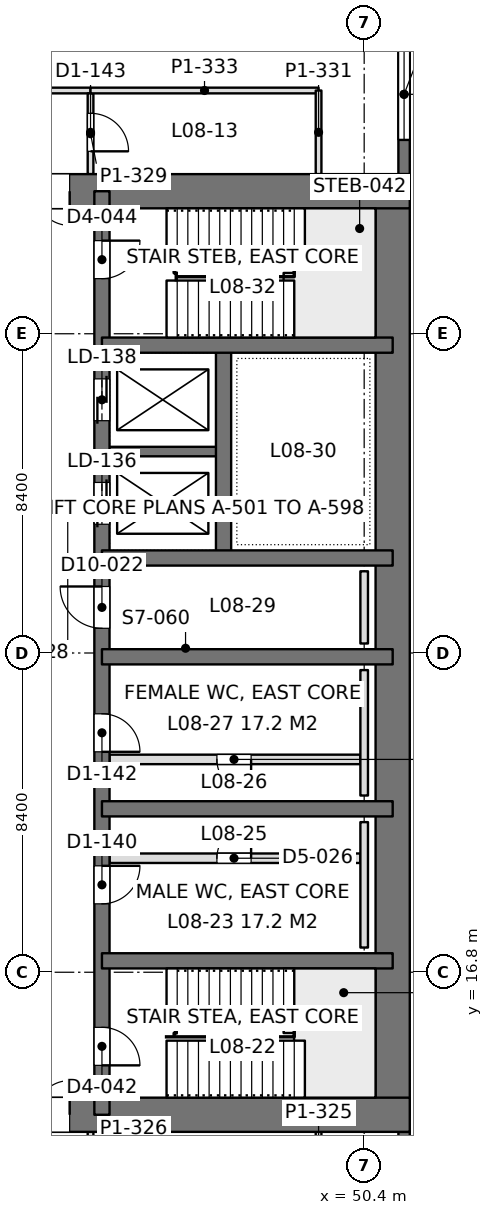
"""IFC4 building model, lengths in metres.
Left out: names, types, materials, properties, quantities, classifications, styles, units other than length and angle.
Written with IfcOpenShell. Run it as: python <this file> out.ifc"""

import sys

from ifc_helpers import new_model, si_unit, direction, frame, frame_2d, origin, place, context, subcontext, project, spatial, rectangle, extrude, element, fill, save


model = new_model("IFC4")
c1 = context("Model", 3, precision=1e-05, world=origin(), true_north=direction((0.0, 1.0)))
c2 = subcontext(c1, "Body", "Model", "MODEL_VIEW")
j1 = project(units=[si_unit("LENGTHUNIT", "METRE"), si_unit("PLANEANGLEUNIT", "RADIAN")], contexts=[c1])
p1 = place(None, origin())
s1 = spatial("IfcSite", under=j1, at=p1, CompositionType="ELEMENT")
p2 = place(p1, origin())
s2 = spatial("IfcBuilding", under=s1, at=p2, CompositionType="ELEMENT")
p3 = place(p2, frame((0.0, 0.0, 36.9)))
s3 = spatial("IfcBuildingStorey", under=s2, at=p3, CompositionType="ELEMENT", Elevation=36.9)
p4 = place(p3, frame((33.6, 13.05, 0.0), z_axis=(0.0, 0.0, 1.0), x_axis=(1.0, 0.0, 0.0)))
e1 = element("IfcWall", 1, at=p4, inside=s3, PredefinedType="SHEAR", context=c2, shape_type="SweptSolid", body=[
    extrude(rectangle(XDim=18.0, YDim=0.9, at=frame_2d((9.0, 0.0))), origin(), (0.0, 0.0, 1.0), 4.5),
])
p5 = place(p4, frame((7.25, 0.0, 0.0)))
e2 = element("IfcOpeningElement", 2, at=p5, cuts=e1, PredefinedType="OPENING", context=c2, shape_type="SweptSolid", body=[
    extrude(rectangle(XDim=1.8, YDim=2.4, at=frame_2d((0.9, 1.2))), frame((0.0, 0.46, 0.0), z_axis=(0.0, -1.0, 0.0), x_axis=(1.0, 0.0, 0.0)), (0.0, 0.0, 1.0), 0.92),
])
p6 = place(p3, frame((33.6, 37.35, 0.0), z_axis=(0.0, 0.0, 1.0), x_axis=(1.0, 0.0, 0.0)))
e3 = element("IfcWall", 3, at=p6, inside=s3, PredefinedType="SHEAR", context=c2, shape_type="SweptSolid", body=[
    extrude(rectangle(XDim=18.0, YDim=0.9, at=frame_2d((9.0, 0.0))), origin(), (0.0, 0.0, 1.0), 4.5),
])
p7 = place(p6, frame((7.25, 0.0, 0.0)))
e4 = element("IfcOpeningElement", 4, at=p7, cuts=e3, PredefinedType="OPENING", context=c2, shape_type="SweptSolid", body=[
    extrude(rectangle(XDim=1.8, YDim=2.4, at=frame_2d((0.9, 1.2))), frame((0.0, 0.46, 0.0), z_axis=(0.0, -1.0, 0.0), x_axis=(1.0, 0.0, 0.0)), (0.0, 0.0, 1.0), 0.92),
])
p8 = place(p3, frame((51.15, 13.05, 0.0), z_axis=(0.0, 0.0, 1.0), x_axis=(0.0, 1.0, 0.0)))
e5 = element("IfcWall", 5, at=p8, inside=s3, PredefinedType="SHEAR", context=c2, shape_type="SweptSolid", body=[
    extrude(rectangle(XDim=24.3, YDim=0.9, at=frame_2d((12.15, 0.0))), origin(), (0.0, 0.0, 1.0), 4.5),
])
p9 = place(p3, frame((43.5, 13.05, 0.0), z_axis=(0.0, 0.0, 1.0), x_axis=(0.0, 1.0, 0.0)))
e6 = element("IfcWall", 6, at=p9, inside=s3, PredefinedType="SHEAR", context=c2, shape_type="SweptSolid", body=[
    extrude(rectangle(XDim=24.3, YDim=0.4, at=frame_2d((12.15, 0.0))), origin(), (0.0, 0.0, 1.0), 4.5),
])
p10 = place(p9, frame((1.3, 0.0, 0.0)))
e7 = element("IfcOpeningElement", 7, at=p10, cuts=e6, PredefinedType="OPENING", context=c2, shape_type="SweptSolid", body=[
    extrude(rectangle(XDim=1.0, YDim=2.2, at=frame_2d((0.5, 1.1))), frame((0.0, 0.21, 0.0), z_axis=(0.0, -1.0, 0.0), x_axis=(1.0, 0.0, 0.0)), (0.0, 0.0, 1.0), 0.42),
])
p11 = place(p9, frame((22.0, 0.0, 0.0)))
e8 = element("IfcOpeningElement", 8, at=p11, cuts=e6, PredefinedType="OPENING", context=c2, shape_type="SweptSolid", body=[
    extrude(rectangle(XDim=1.0, YDim=2.2, at=frame_2d((0.5, 1.1))), frame((0.0, 0.21, 0.0), z_axis=(0.0, -1.0, 0.0), x_axis=(1.0, 0.0, 0.0)), (0.0, 0.0, 1.0), 0.42),
])
p12 = place(p9, frame((5.55, 0.0, 0.0)))
e9 = element("IfcOpeningElement", 9, at=p12, cuts=e6, PredefinedType="OPENING", context=c2, shape_type="SweptSolid", body=[
    extrude(rectangle(XDim=1.0, YDim=2.2, at=frame_2d((0.5, 1.1))), frame((0.0, 0.21, 0.0), z_axis=(0.0, -1.0, 0.0), x_axis=(1.0, 0.0, 0.0)), (0.0, 0.0, 1.0), 0.42),
])
p13 = place(p9, frame((9.55, 0.0, 0.0)))
e10 = element("IfcOpeningElement", 10, at=p13, cuts=e6, PredefinedType="OPENING", context=c2, shape_type="SweptSolid", body=[
    extrude(rectangle(XDim=1.0, YDim=2.2, at=frame_2d((0.5, 1.1))), frame((0.0, 0.21, 0.0), z_axis=(0.0, -1.0, 0.0), x_axis=(1.0, 0.0, 0.0)), (0.0, 0.0, 1.0), 0.42),
])
p14 = place(p9, frame((12.8, 0.0, 0.0)))
e11 = element("IfcOpeningElement", 11, at=p14, cuts=e6, PredefinedType="OPENING", context=c2, shape_type="SweptSolid", body=[
    extrude(rectangle(XDim=1.1, YDim=2.2, at=frame_2d((0.55, 1.1))), frame((0.0, 0.21, 0.0), z_axis=(0.0, -1.0, 0.0), x_axis=(1.0, 0.0, 0.0)), (0.0, 0.0, 1.0), 0.42),
])
p15 = place(p9, frame((15.538, 0.0, 0.0)))
e12 = element("IfcOpeningElement", 12, at=p15, cuts=e6, PredefinedType="OPENING", context=c2, shape_type="SweptSolid", body=[
    extrude(rectangle(XDim=1.1, YDim=2.2, at=frame_2d((0.55, 1.1))), frame((0.0, 0.21, 0.0), z_axis=(0.0, -1.0, 0.0), x_axis=(1.0, 0.0, 0.0)), (0.0, 0.0, 1.0), 0.42),
])
p16 = place(p9, frame((18.262, 0.0, 0.0)))
e13 = element("IfcOpeningElement", 13, at=p16, cuts=e6, PredefinedType="OPENING", context=c2, shape_type="SweptSolid", body=[
    extrude(rectangle(XDim=1.1, YDim=2.2, at=frame_2d((0.55, 1.1))), frame((0.0, 0.21, 0.0), z_axis=(0.0, -1.0, 0.0), x_axis=(1.0, 0.0, 0.0)), (0.0, 0.0, 1.0), 0.42),
])
for number, where, z_axis, x_axis in (
    (14, (51.15, 17.1, 0.0), (0.0, 0.0, 1.0), (-1.0, 0.0, 0.0)),
    (15, (51.15, 21.1, 0.0), (0.0, 0.0, 1.0), (-1.0, 0.0, 0.0)),
    (16, (51.15, 25.1, 0.0), (0.0, 0.0, 1.0), (-1.0, 0.0, 0.0)),
    (17, (51.15, 27.7, 0.0), (0.0, 0.0, 1.0), (-1.0, 0.0, 0.0)),
    (18, (51.15, 33.3, 0.0), (0.0, 0.0, 1.0), (-1.0, 0.0, 0.0)),
):
    element("IfcWall", number, at=place(p3, frame(where, z_axis=z_axis, x_axis=x_axis)), inside=s3, PredefinedType="SHEAR", context=c2, shape_type="SweptSolid", body=[
        extrude(rectangle(XDim=7.65, YDim=0.4, at=frame_2d((3.825, 0.0))), origin(), (0.0, 0.0, 1.0), 4.5),
    ])
p17 = place(p3, frame((46.7, 27.7, 0.0), z_axis=(0.0, 0.0, 1.0), x_axis=(0.0, 1.0, 0.0)))
e19 = element("IfcWall", 19, at=p17, inside=s3, PredefinedType="SHEAR", context=c2, shape_type="SweptSolid", body=[
    extrude(rectangle(XDim=5.6, YDim=0.4, at=frame_2d((2.8, 0.0))), origin(), (0.0, 0.0, 1.0), 4.5),
])
p18 = place(p3, frame((46.7, 30.5, 0.0), z_axis=(0.0, 0.0, 1.0), x_axis=(-1.0, 0.0, 0.0)))
e20 = element("IfcWall", 20, at=p18, inside=s3, PredefinedType="SHEAR", context=c2, shape_type="SweptSolid", body=[
    extrude(rectangle(XDim=3.2, YDim=0.25, at=frame_2d((1.6, 0.0))), origin(), (0.0, 0.0, 1.0), 4.5),
])
p19 = place(p3, frame((51.45, 42.0, 0.0), z_axis=(0.0, 0.0, 1.0), x_axis=(0.0, -1.0, 0.0)))
e21 = element("IfcWall", 21, at=p19, inside=s3, PredefinedType="SOLIDWALL", context=c2, shape_type="SweptSolid", body=[
    extrude(rectangle(XDim=4.2, YDim=0.3, at=frame_2d((2.1, 0.0))), origin(), (0.0, 0.0, 1.0), 4.34),
])
p20 = place(p19, frame((0.9, 0.0, 0.9)))
e22 = element("IfcOpeningElement", 22, at=p20, cuts=e21, PredefinedType="OPENING", context=c2, shape_type="SweptSolid", body=[
    extrude(rectangle(XDim=2.4, YDim=1.9, at=frame_2d((1.2, 0.95))), frame((0.0, 0.16, 0.0), z_axis=(0.0, -1.0, 0.0), x_axis=(1.0, 0.0, 0.0)), (0.0, 0.0, 1.0), 0.32),
])
p21 = place(p3, frame((51.45, 12.6, 0.0), z_axis=(0.0, 0.0, 1.0), x_axis=(0.0, -1.0, 0.0)))
e23 = element("IfcWall", 23, at=p21, inside=s3, PredefinedType="SOLIDWALL", context=c2, shape_type="SweptSolid", body=[
    extrude(rectangle(XDim=4.2, YDim=0.3, at=frame_2d((2.1, 0.0))), origin(), (0.0, 0.0, 1.0), 4.34),
])
p22 = place(p21, frame((0.9, 0.0, 0.9)))
e24 = element("IfcOpeningElement", 24, at=p22, cuts=e23, PredefinedType="OPENING", context=c2, shape_type="SweptSolid", body=[
    extrude(rectangle(XDim=2.4, YDim=1.9, at=frame_2d((1.2, 0.95))), frame((0.0, 0.16, 0.0), z_axis=(0.0, -1.0, 0.0), x_axis=(1.0, 0.0, 0.0)), (0.0, 0.0, 1.0), 0.32),
])
p23 = place(p3, frame((43.2, 10.474, 0.0), z_axis=(0.0, 0.0, 1.0), x_axis=(0.0, 1.0, 0.0)))
e25 = element("IfcWall", 25, at=p23, inside=s3, PredefinedType="PARTITIONING", context=c2, shape_type="SweptSolid", body=[
    extrude(rectangle(XDim=2.128, YDim=0.15, at=frame_2d((1.064, 0.0))), origin(), (0.0, 0.0, 1.0), 4.34),
])
p24 = place(p23, frame((0.526, 0.0, 0.0)))
e26 = element("IfcOpeningElement", 26, at=p24, cuts=e25, PredefinedType="OPENING", context=c2, shape_type="SweptSolid", body=[
    extrude(rectangle(XDim=1.0, YDim=2.2, at=frame_2d((0.5, 1.1))), frame((0.0, 0.085, 0.0), z_axis=(0.0, -1.0, 0.0), x_axis=(1.0, 0.0, 0.0)), (0.0, 0.0, 1.0), 0.17),
])
p25 = place(p3, frame((49.2, 10.4, 0.0), z_axis=(0.0, 0.0, 1.0), x_axis=(0.0, 1.0, 0.0)))
e27 = element("IfcWall", 27, at=p25, inside=s3, PredefinedType="PARTITIONING", context=c2, shape_type="SweptSolid", body=[
    extrude(rectangle(XDim=2.202, YDim=0.15, at=frame_2d((1.101, 0.0))), origin(), (0.0, 0.0, 1.0), 4.34),
])
p26 = place(p3, frame((1.2, 40.0, 0.0), z_axis=(0.0, 0.0, 1.0), x_axis=(1.0, 0.0, 0.0)))
e28 = element("IfcWall", 28, at=p26, inside=s3, PredefinedType="PARTITIONING", context=c2, shape_type="SweptSolid", body=[
    extrude(rectangle(XDim=42.002, YDim=0.15, at=frame_2d((21.001, 0.0))), origin(), (0.0, 0.0, 1.0), 3.74),
])
p27 = place(p26, frame((2.1, 0.0, 0.0)))
e29 = element("IfcOpeningElement", 29, at=p27, cuts=e28, PredefinedType="OPENING", context=c2, shape_type="SweptSolid", body=[
    extrude(rectangle(XDim=1.8, YDim=2.2, at=frame_2d((0.9, 1.1))), frame((0.0, 0.085, 0.0), z_axis=(0.0, -1.0, 0.0), x_axis=(1.0, 0.0, 0.0)), (0.0, 0.0, 1.0), 0.17),
])
p28 = place(p26, frame((10.5, 0.0, 0.0)))
e30 = element("IfcOpeningElement", 30, at=p28, cuts=e28, PredefinedType="OPENING", context=c2, shape_type="SweptSolid", body=[
    extrude(rectangle(XDim=1.8, YDim=2.2, at=frame_2d((0.9, 1.1))), frame((0.0, 0.085, 0.0), z_axis=(0.0, -1.0, 0.0), x_axis=(1.0, 0.0, 0.0)), (0.0, 0.0, 1.0), 0.17),
])
p29 = place(p26, frame((18.9, 0.0, 0.0)))
e31 = element("IfcOpeningElement", 31, at=p29, cuts=e28, PredefinedType="OPENING", context=c2, shape_type="SweptSolid", body=[
    extrude(rectangle(XDim=1.8, YDim=2.2, at=frame_2d((0.9, 1.1))), frame((0.0, 0.085, 0.0), z_axis=(0.0, -1.0, 0.0), x_axis=(1.0, 0.0, 0.0)), (0.0, 0.0, 1.0), 0.17),
])
p30 = place(p26, frame((27.3, 0.0, 0.0)))
e32 = element("IfcOpeningElement", 32, at=p30, cuts=e28, PredefinedType="OPENING", context=c2, shape_type="SweptSolid", body=[
    extrude(rectangle(XDim=1.8, YDim=2.2, at=frame_2d((0.9, 1.1))), frame((0.0, 0.085, 0.0), z_axis=(0.0, -1.0, 0.0), x_axis=(1.0, 0.0, 0.0)), (0.0, 0.0, 1.0), 0.17),
])
p31 = place(p26, frame((35.7, 0.0, 0.0)))
e33 = element("IfcOpeningElement", 33, at=p31, cuts=e28, PredefinedType="OPENING", context=c2, shape_type="SweptSolid", body=[
    extrude(rectangle(XDim=1.8, YDim=2.2, at=frame_2d((0.9, 1.1))), frame((0.0, 0.085, 0.0), z_axis=(0.0, -1.0, 0.0), x_axis=(1.0, 0.0, 0.0)), (0.0, 0.0, 1.0), 0.17),
])
p32 = place(p3, frame((43.2, 37.8, 0.0), z_axis=(0.0, 0.0, 1.0), x_axis=(0.0, 1.0, 0.0)))
e34 = element("IfcWall", 34, at=p32, inside=s3, PredefinedType="PARTITIONING", context=c2, shape_type="SweptSolid", body=[
    extrude(rectangle(XDim=2.126, YDim=0.15, at=frame_2d((1.063, 0.0))), origin(), (0.0, 0.0, 1.0), 4.34),
])
p33 = place(p32, frame((0.6, 0.0, 0.0)))
e35 = element("IfcOpeningElement", 35, at=p33, cuts=e34, PredefinedType="OPENING", context=c2, shape_type="SweptSolid", body=[
    extrude(rectangle(XDim=1.0, YDim=2.2, at=frame_2d((0.5, 1.1))), frame((0.0, 0.085, 0.0), z_axis=(0.0, -1.0, 0.0), x_axis=(1.0, 0.0, 0.0)), (0.0, 0.0, 1.0), 0.17),
])
p34 = place(p3, frame((43.198, 40.0, 0.0), z_axis=(0.0, 0.0, 1.0), x_axis=(1.0, 0.0, 0.0)))
e36 = element("IfcWall", 36, at=p34, inside=s3, PredefinedType="PARTITIONING", context=c2, shape_type="SweptSolid", body=[
    extrude(rectangle(XDim=6.002, YDim=0.15, at=frame_2d((3.001, 0.0))), origin(), (0.0, 0.0, 1.0), 3.98),
])
p35 = place(p3, frame((49.2, 37.8, 0.0), z_axis=(0.0, 0.0, 1.0), x_axis=(0.0, 1.0, 0.0)))
e37 = element("IfcWall", 37, at=p35, inside=s3, PredefinedType="PARTITIONING", context=c2, shape_type="SweptSolid", body=[
    extrude(rectangle(XDim=2.2, YDim=0.15, at=frame_2d((1.1, 0.0))), origin(), (0.0, 0.0, 1.0), 4.34),
])
p36 = place(p3, frame((43.7, 22.4, 0.0), z_axis=(0.0, 0.0, 1.0), x_axis=(1.0, 0.0, 0.0)))
e38 = element("IfcWall", 38, at=p36, inside=s3, PredefinedType="PARTITIONING", context=c2, shape_type="SweptSolid", body=[
    extrude(rectangle(XDim=6.6, YDim=0.25, at=frame_2d((3.3, 0.0))), origin(), (0.0, 0.0, 1.0), 4.3),
])
p37 = place(p36, frame((2.825, 0.0, 0.0)))
e39 = element("IfcOpeningElement", 39, at=p37, cuts=e38, PredefinedType="OPENING", context=c2, shape_type="SweptSolid", body=[
    extrude(rectangle(XDim=0.9, YDim=2.2, at=frame_2d((0.45, 1.1))), frame((0.0, 0.135, 0.0), z_axis=(0.0, -1.0, 0.0), x_axis=(1.0, 0.0, 0.0)), (0.0, 0.0, 1.0), 0.27),
])
p38 = place(p3, frame((43.7, 19.8, 0.0), z_axis=(0.0, 0.0, 1.0), x_axis=(1.0, 0.0, 0.0)))
e40 = element("IfcWall", 40, at=p38, inside=s3, PredefinedType="PARTITIONING", context=c2, shape_type="SweptSolid", body=[
    extrude(rectangle(XDim=6.6, YDim=0.25, at=frame_2d((3.3, 0.0))), origin(), (0.0, 0.0, 1.0), 4.3),
])
p39 = place(p38, frame((2.825, 0.0, 0.0)))
e41 = element("IfcOpeningElement", 41, at=p39, cuts=e40, PredefinedType="OPENING", context=c2, shape_type="SweptSolid", body=[
    extrude(rectangle(XDim=0.9, YDim=2.2, at=frame_2d((0.45, 1.1))), frame((0.0, 0.135, 0.0), z_axis=(0.0, -1.0, 0.0), x_axis=(1.0, 0.0, 0.0)), (0.0, 0.0, 1.0), 0.27),
])
for number, where, z_axis, x_axis in (
    (42, (50.4, 17.45, 0.0), (0.0, 0.0, 1.0), (0.0, 1.0, 0.0)),
    (43, (50.4, 21.45, 0.0), (0.0, 0.0, 1.0), (0.0, 1.0, 0.0)),
):
    element("IfcWall", number, at=place(p3, frame(where, z_axis=z_axis, x_axis=x_axis)), inside=s3, PredefinedType="PLUMBINGWALL", context=c2, shape_type="SweptSolid", body=[
        extrude(rectangle(XDim=3.3, YDim=0.2, at=frame_2d((1.65, 0.0))), origin(), (0.0, 0.0, 1.0), 1.2),
    ])
p40 = place(p3, frame((50.4, 25.45, 0.0), z_axis=(0.0, 0.0, 1.0), x_axis=(0.0, 1.0, 0.0)))
e44 = element("IfcWall", 44, at=p40, inside=s3, PredefinedType="PLUMBINGWALL", context=c2, shape_type="SweptSolid", body=[
    extrude(rectangle(XDim=1.9, YDim=0.2, at=frame_2d((0.95, 0.0))), origin(), (0.0, 0.0, 1.0), 1.2),
])
p41 = place(p20, origin())
e45 = element("IfcWindow", 45, at=p41, inside=s3, PartitioningType="SINGLE_PANEL", PredefinedType="WINDOW", context=c2, shape_type="SweptSolid", body=[
    extrude(rectangle(XDim=2.4, YDim=1.9, at=frame_2d((1.2, 0.95))), frame((0.0, 0.03, 0.0), z_axis=(0.0, -1.0, 0.0), x_axis=(1.0, 0.0, 0.0)), (0.0, 0.0, 1.0), 0.06),
])
fill(e22, e45)
p42 = place(p5, origin())
e46 = element("IfcDoor", 46, at=p42, inside=s3, OperationType="DOUBLE_DOOR_SINGLE_SWING", PredefinedType="DOOR", context=c2, shape_type="SweptSolid", body=[
    extrude(rectangle(XDim=1.8, YDim=2.4, at=frame_2d((0.9, 1.2))), frame((0.0, 0.025, 0.0), z_axis=(0.0, -1.0, 0.0), x_axis=(1.0, 0.0, 0.0)), (0.0, 0.0, 1.0), 0.05),
])
fill(e2, e46)
p43 = place(p7, frame((1.8, 0.0, 0.0), z_axis=(0.0, 0.0, 1.0), x_axis=(-1.0, 0.0, 0.0)))
e47 = element("IfcDoor", 47, at=p43, inside=s3, OperationType="DOUBLE_DOOR_SINGLE_SWING", PredefinedType="DOOR", context=c2, shape_type="SweptSolid", body=[
    extrude(rectangle(XDim=1.8, YDim=2.4, at=frame_2d((0.9, 1.2))), frame((0.0, 0.025, 0.0), z_axis=(0.0, -1.0, 0.0), x_axis=(1.0, 0.0, 0.0)), (0.0, 0.0, 1.0), 0.05),
])
fill(e4, e47)
p44 = place(p10, frame((1.0, 0.0, 0.0), z_axis=(0.0, 0.0, 1.0), x_axis=(-1.0, 0.0, 0.0)))
e48 = element("IfcDoor", 48, at=p44, inside=s3, OperationType="SINGLE_SWING_RIGHT", PredefinedType="DOOR", context=c2, shape_type="SweptSolid", body=[
    extrude(rectangle(XDim=1.0, YDim=2.2, at=frame_2d((0.5, 1.1))), frame((0.0, 0.025, 0.0), z_axis=(0.0, -1.0, 0.0), x_axis=(1.0, 0.0, 0.0)), (0.0, 0.0, 1.0), 0.05),
])
fill(e7, e48)
p45 = place(p11, frame((1.0, 0.0, 0.0), z_axis=(0.0, 0.0, 1.0), x_axis=(-1.0, 0.0, 0.0)))
e49 = element("IfcDoor", 49, at=p45, inside=s3, OperationType="SINGLE_SWING_LEFT", PredefinedType="DOOR", context=c2, shape_type="SweptSolid", body=[
    extrude(rectangle(XDim=1.0, YDim=2.2, at=frame_2d((0.5, 1.1))), frame((0.0, 0.025, 0.0), z_axis=(0.0, -1.0, 0.0), x_axis=(1.0, 0.0, 0.0)), (0.0, 0.0, 1.0), 0.05),
])
fill(e8, e49)
p46 = place(p12, frame((1.0, 0.0, 0.0), z_axis=(0.0, 0.0, 1.0), x_axis=(-1.0, 0.0, 0.0)))
e50 = element("IfcDoor", 50, at=p46, inside=s3, OperationType="SINGLE_SWING_LEFT", PredefinedType="DOOR", context=c2, shape_type="SweptSolid", body=[
    extrude(rectangle(XDim=1.0, YDim=2.2, at=frame_2d((0.5, 1.1))), frame((0.0, 0.025, 0.0), z_axis=(0.0, -1.0, 0.0), x_axis=(1.0, 0.0, 0.0)), (0.0, 0.0, 1.0), 0.05),
])
fill(e9, e50)
p47 = place(p13, frame((1.0, 0.0, 0.0), z_axis=(0.0, 0.0, 1.0), x_axis=(-1.0, 0.0, 0.0)))
e51 = element("IfcDoor", 51, at=p47, inside=s3, OperationType="SINGLE_SWING_RIGHT", PredefinedType="DOOR", context=c2, shape_type="SweptSolid", body=[
    extrude(rectangle(XDim=1.0, YDim=2.2, at=frame_2d((0.5, 1.1))), frame((0.0, 0.025, 0.0), z_axis=(0.0, -1.0, 0.0), x_axis=(1.0, 0.0, 0.0)), (0.0, 0.0, 1.0), 0.05),
])
fill(e10, e51)
p48 = place(p14, origin())
e52 = element("IfcDoor", 52, at=p48, inside=s3, OperationType="SINGLE_SWING_RIGHT", PredefinedType="DOOR", context=c2, shape_type="SweptSolid", body=[
    extrude(rectangle(XDim=1.1, YDim=2.2, at=frame_2d((0.55, 1.1))), frame((0.0, 0.025, 0.0), z_axis=(0.0, -1.0, 0.0), x_axis=(1.0, 0.0, 0.0)), (0.0, 0.0, 1.0), 0.05),
])
fill(e11, e52)
p49 = place(p15, origin())
e53 = element("IfcDoor", 53, at=p49, inside=s3, OperationType="DOUBLE_DOOR_SLIDING", PredefinedType="DOOR", context=c2, shape_type="SweptSolid", body=[
    extrude(rectangle(XDim=1.1, YDim=2.2, at=frame_2d((0.55, 1.1))), frame((0.0, 0.025, 0.0), z_axis=(0.0, -1.0, 0.0), x_axis=(1.0, 0.0, 0.0)), (0.0, 0.0, 1.0), 0.05),
])
fill(e12, e53)
p50 = place(p16, origin())
e54 = element("IfcDoor", 54, at=p50, inside=s3, OperationType="DOUBLE_DOOR_SLIDING", PredefinedType="DOOR", context=c2, shape_type="SweptSolid", body=[
    extrude(rectangle(XDim=1.1, YDim=2.2, at=frame_2d((0.55, 1.1))), frame((0.0, 0.025, 0.0), z_axis=(0.0, -1.0, 0.0), x_axis=(1.0, 0.0, 0.0)), (0.0, 0.0, 1.0), 0.05),
])
fill(e13, e54)
p51 = place(p33, frame((1.0, 0.0, 0.0), z_axis=(0.0, 0.0, 1.0), x_axis=(-1.0, 0.0, 0.0)))
e55 = element("IfcDoor", 55, at=p51, inside=s3, OperationType="SINGLE_SWING_RIGHT", PredefinedType="DOOR", context=c2, shape_type="SweptSolid", body=[
    extrude(rectangle(XDim=1.0, YDim=2.2, at=frame_2d((0.5, 1.1))), frame((0.0, 0.025, 0.0), z_axis=(0.0, -1.0, 0.0), x_axis=(1.0, 0.0, 0.0)), (0.0, 0.0, 1.0), 0.05),
])
fill(e35, e55)
p52 = place(p37, frame((0.9, 0.0, 0.0), z_axis=(0.0, 0.0, 1.0), x_axis=(-1.0, 0.0, 0.0)))
e56 = element("IfcDoor", 56, at=p52, inside=s3, OperationType="SINGLE_SWING_LEFT", PredefinedType="DOOR", context=c2, shape_type="SweptSolid", body=[
    extrude(rectangle(XDim=0.9, YDim=2.2, at=frame_2d((0.45, 1.1))), frame((0.0, 0.025, 0.0), z_axis=(0.0, -1.0, 0.0), x_axis=(1.0, 0.0, 0.0)), (0.0, 0.0, 1.0), 0.05),
])
fill(e39, e56)
p53 = place(p39, origin())
e57 = element("IfcDoor", 57, at=p53, inside=s3, OperationType="SINGLE_SWING_RIGHT", PredefinedType="DOOR", context=c2, shape_type="SweptSolid", body=[
    extrude(rectangle(XDim=0.9, YDim=2.2, at=frame_2d((0.45, 1.1))), frame((0.0, 0.025, 0.0), z_axis=(0.0, -1.0, 0.0), x_axis=(1.0, 0.0, 0.0)), (0.0, 0.0, 1.0), 0.05),
])
fill(e41, e57)
save(model, sys.argv[1])
